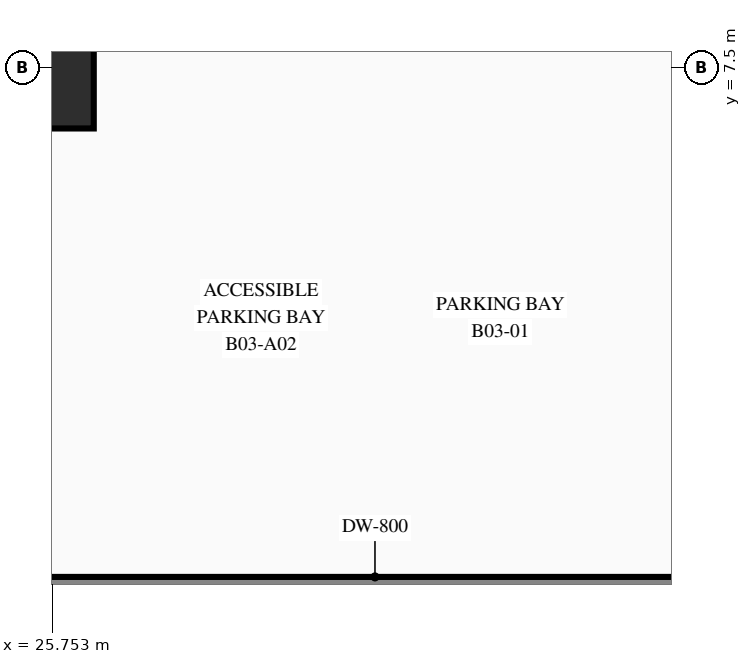
"""IFC4 building model, lengths in metres.
Left out: names, types, materials, properties, quantities, classifications, styles, units other than length and angle.
Written with IfcOpenShell. Run it as: python <this file> out.ifc"""

import sys

from ifc_helpers import new_model, si_unit, direction, frame, frame_2d, origin, origin_2d, place, context, subcontext, project, spatial, rectangle, extrude, element, save


model = new_model("IFC4")
c1 = context("Model", 3, precision=1e-05, world=origin(), true_north=direction((0.0, 1.0)))
c2 = subcontext(c1, "Body", "Model", "MODEL_VIEW")
j1 = project(units=[si_unit("LENGTHUNIT", "METRE"), si_unit("PLANEANGLEUNIT", "RADIAN")], contexts=[c1])
p1 = place(None, origin())
s1 = spatial("IfcSite", under=j1, at=p1, CompositionType="ELEMENT")
p2 = place(p1, origin())
s2 = spatial("IfcBuilding", under=s1, at=p2, CompositionType="ELEMENT")
p3 = place(p2, frame((0.0, 0.0, -13.5)))
s3 = spatial("IfcBuildingStorey", under=s2, at=p3, CompositionType="ELEMENT", Elevation=-13.5)
p4 = place(p3, frame((0.0, 0.4, 0.0), z_axis=(0.0, 0.0, 1.0), x_axis=(1.0, 0.0, 0.0)))
e1 = element("IfcWall", 1, at=p4, inside=s3, PredefinedType="USERDEFINED", context=c2, shape_type="SweptSolid", body=[
    extrude(rectangle(XDim=60.0, YDim=0.8, at=frame_2d((30.0, 0.0))), origin(), (0.0, 0.0, 1.0), 4.5),
])
p5 = place(p3, frame((25.5, 7.5, 0.0), z_axis=(0.0, 0.0, 1.0), x_axis=(1.0, 0.0, 0.0)))
e2 = element("IfcColumn", 2, at=p5, inside=s3, PredefinedType="COLUMN", context=c2, shape_type="SweptSolid", body=[
    extrude(rectangle(XDim=1.6, YDim=1.6, at=origin_2d()), origin(), (0.0, 0.0, 1.0), 4.5),
])
save(model, sys.argv[1])
